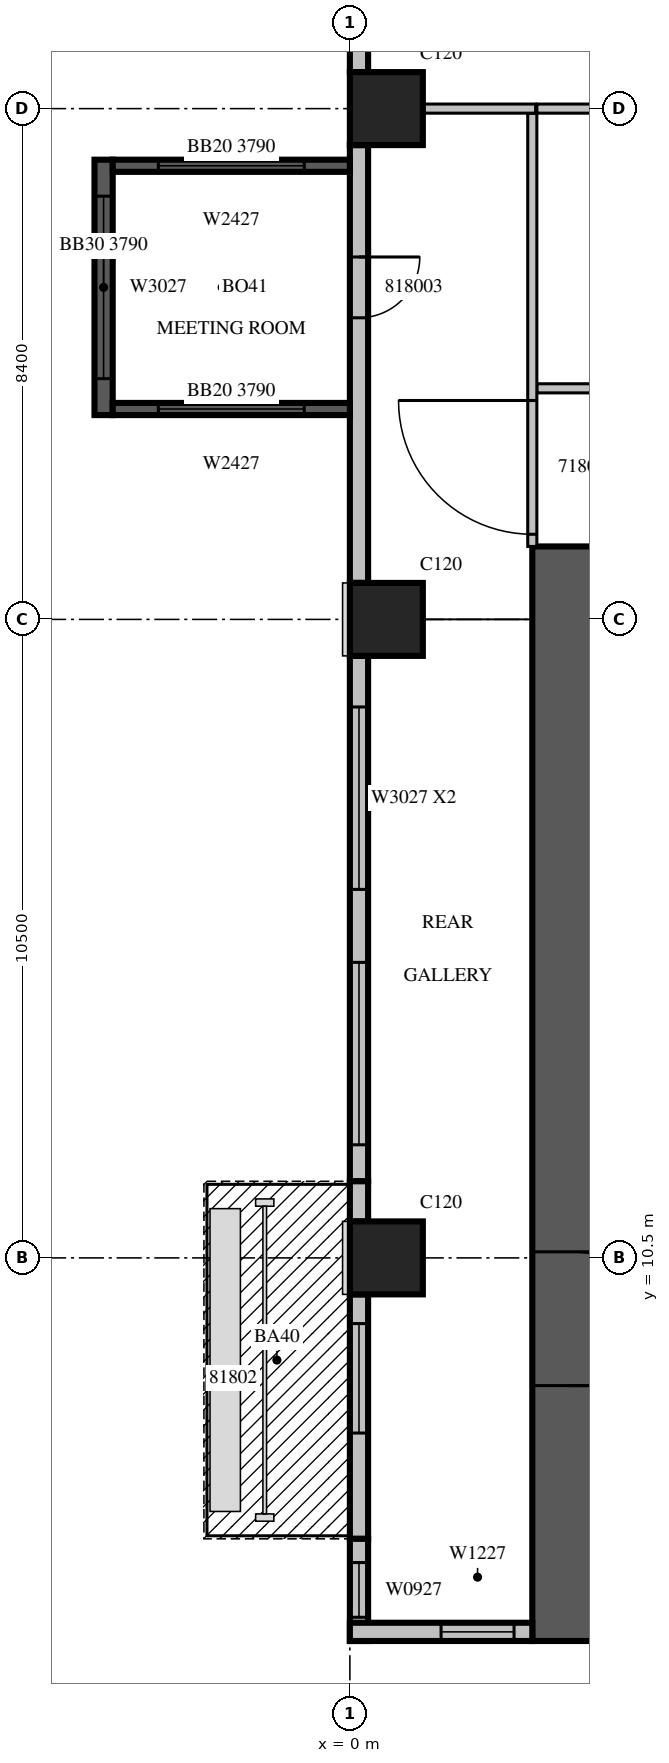
"""IFC4 building model, lengths in metres.
Left out: names, types, materials, properties, quantities, classifications, styles, units other than length and angle.
Written with IfcOpenShell. Run it as: python <this file> out.ifc"""

import sys

from ifc_helpers import new_model, si_unit, direction, frame, frame_2d, origin, origin_2d, place, context, subcontext, project, spatial, rectangle, extrude, source, transform, mapped, element, fill, save


model = new_model("IFC4")
c1 = context("Model", 3, precision=1e-05, world=origin(), true_north=direction((0.0, 1.0)))
c2 = subcontext(c1, "Body", "Model", "MODEL_VIEW")
j1 = project(units=[si_unit("LENGTHUNIT", "METRE"), si_unit("PLANEANGLEUNIT", "RADIAN")], contexts=[c1])
p1 = place(None, origin())
s1 = spatial("IfcSite", under=j1, at=p1, CompositionType="ELEMENT")
p2 = place(p1, origin())
s2 = spatial("IfcBuilding", under=s1, at=p2, CompositionType="ELEMENT")
p3 = place(p2, frame((0.0, 0.0, 86.7)))
s3 = spatial("IfcBuildingStorey", under=s2, at=p3, CompositionType="ELEMENT", Elevation=86.7)
m1 = source(origin(), c2, "Body", "SweptSolid", [
    extrude(rectangle(XDim=1.2, YDim=1.2, at=origin_2d()), origin(), (0.0, 0.0, 1.0), 4.2),
])
for number, where, z_axis, x_axis in (
    (1, (0.6, 10.5, 0.0), (0.0, 0.0, 1.0), (1.0, 0.0, 0.0)),
    (2, (0.6, 21.0, 0.0), (0.0, 0.0, 1.0), (1.0, 0.0, 0.0)),
    (3, (0.6, 29.4, 0.0), (0.0, 0.0, 1.0), (1.0, 0.0, 0.0)),
):
    element("IfcColumn", number, at=place(p3, frame(where, z_axis=z_axis, x_axis=x_axis)), inside=s3, PredefinedType="COLUMN", context=c2, shape_type="MappedRepresentation", body=[
        mapped(m1, transform((0.0, 0.0, 0.0), scale=1.0)),
    ])
m2 = source(origin(), c2, "Body", "SweptSolid", [
    extrude(rectangle(XDim=18.0, YDim=1.2, at=frame_2d((9.0, 0.0))), origin(), (0.0, 0.0, 1.0), 4.2),
])
p4 = place(p3, frame((3.6, 4.2, 0.0), z_axis=(0.0, 0.0, 1.0), x_axis=(0.0, 1.0, 0.0)))
e4 = element("IfcWall", 4, at=p4, inside=s3, PredefinedType="SHEAR", context=c2, shape_type="MappedRepresentation", body=[
    mapped(m2, transform((0.0, 0.0, 0.0), scale=1.0)),
])
m3 = source(origin(), c2, "Body", "SweptSolid", [
    extrude(rectangle(XDim=2.2, YDim=2.1, at=frame_2d((1.1, 1.05))), frame((0.0, 0.61, 0.0), z_axis=(0.0, -1.0, 0.0), x_axis=(1.0, 0.0, 0.0)), (0.0, 0.0, 1.0), 1.22),
])
p5 = place(p4, frame((4.2, 0.0, 0.0)))
e5 = element("IfcOpeningElement", 5, at=p5, cuts=e4, PredefinedType="OPENING", context=c2, shape_type="MappedRepresentation", body=[
    mapped(m3, transform((0.0, 0.0, 0.0), scale=1.0)),
])
m4 = source(origin(), c2, "Body", "SweptSolid", [
    extrude(rectangle(XDim=7.2, YDim=0.3, at=frame_2d((3.6, 0.0))), origin(), (0.0, 0.0, 1.0), 3.8),
])
p6 = place(p3, frame((0.15, 37.2, 0.0), z_axis=(0.0, 0.0, 1.0), x_axis=(0.0, -1.0, 0.0)))
e6 = element("IfcWall", 6, at=p6, inside=s3, PredefinedType="STANDARD", context=c2, shape_type="MappedRepresentation", body=[
    mapped(m4, transform((0.0, 0.0, 0.0), scale=1.0)),
])
m5 = source(origin(), c2, "Body", "SweptSolid", [
    extrude(rectangle(XDim=1.8, YDim=2.7, at=frame_2d((0.9, 1.35))), frame((0.0, 0.16, 0.0), z_axis=(0.0, -1.0, 0.0), x_axis=(1.0, 0.0, 0.0)), (0.0, 0.0, 1.0), 0.32),
])
p7 = place(p6, frame((1.008, 0.0, 0.6)))
e7 = element("IfcOpeningElement", 7, at=p7, cuts=e6, PredefinedType="OPENING", context=c2, shape_type="MappedRepresentation", body=[
    mapped(m5, transform((0.0, 0.0, 0.0), scale=1.0)),
])
m6 = source(origin(), c2, "Body", "SweptSolid", [
    extrude(rectangle(XDim=2.4, YDim=2.7, at=frame_2d((1.2, 1.35))), frame((0.0, 0.16, 0.0), z_axis=(0.0, -1.0, 0.0), x_axis=(1.0, 0.0, 0.0)), (0.0, 0.0, 1.0), 0.32),
])
p8 = place(p6, frame((3.804, 0.0, 0.6)))
e8 = element("IfcOpeningElement", 8, at=p8, cuts=e6, PredefinedType="OPENING", context=c2, shape_type="MappedRepresentation", body=[
    mapped(m6, transform((0.0, 0.0, 0.0), scale=1.0)),
])
p9 = place(p3, frame((0.15, 28.8, 0.0), z_axis=(0.0, 0.0, 1.0), x_axis=(0.0, -1.0, 0.0)))
e9 = element("IfcWall", 9, at=p9, inside=s3, PredefinedType="STANDARD", context=c2, shape_type="MappedRepresentation", body=[
    mapped(m4, transform((0.0, 0.0, 0.0), scale=1.0)),
])
m7 = source(origin(), c2, "Body", "SweptSolid", [
    extrude(rectangle(XDim=1.0, YDim=2.1, at=frame_2d((0.5, 1.05))), frame((0.0, 0.16, 0.0), z_axis=(0.0, -1.0, 0.0), x_axis=(1.0, 0.0, 0.0)), (0.0, 0.0, 1.0), 0.32),
])
p10 = place(p9, frame((1.84, 0.0, 0.0)))
e10 = element("IfcOpeningElement", 10, at=p10, cuts=e9, PredefinedType="OPENING", context=c2, shape_type="MappedRepresentation", body=[
    mapped(m7, transform((0.0, 0.0, 0.0), scale=1.0)),
])
m8 = source(origin(), c2, "Body", "SweptSolid", [
    extrude(rectangle(XDim=8.64, YDim=0.3, at=frame_2d((4.32, 0.0))), origin(), (0.0, 0.0, 1.0), 3.8),
])
p11 = place(p3, frame((0.15, 20.4, 0.0), z_axis=(0.0, 0.0, 1.0), x_axis=(0.0, -1.0, 0.0)))
e11 = element("IfcWall", 11, at=p11, inside=s3, PredefinedType="STANDARD", context=c2, shape_type="MappedRepresentation", body=[
    mapped(m8, transform((0.0, 0.0, 0.0), scale=1.0)),
])
m9 = source(origin(), c2, "Body", "SweptSolid", [
    extrude(rectangle(XDim=3.0, YDim=2.7, at=frame_2d((1.5, 1.35))), frame((0.0, 0.16, 0.0), z_axis=(0.0, -1.0, 0.0), x_axis=(1.0, 0.0, 0.0)), (0.0, 0.0, 1.0), 0.32),
])
p12 = place(p11, frame((0.84, 0.0, 0.6)))
e12 = element("IfcOpeningElement", 12, at=p12, cuts=e11, PredefinedType="OPENING", context=c2, shape_type="MappedRepresentation", body=[
    mapped(m9, transform((0.0, 0.0, 0.0), scale=1.0)),
])
p13 = place(p11, frame((5.04, 0.0, 0.6)))
e13 = element("IfcOpeningElement", 13, at=p13, cuts=e11, PredefinedType="OPENING", context=c2, shape_type="MappedRepresentation", body=[
    mapped(m9, transform((0.0, 0.0, 0.0), scale=1.0)),
])
m10 = source(origin(), c2, "Body", "SweptSolid", [
    extrude(rectangle(XDim=0.66, YDim=0.3, at=frame_2d((0.33, 0.0))), origin(), (0.0, 0.0, 1.0), 3.8),
])
p14 = place(p3, frame((0.15, 11.76, 0.0), z_axis=(0.0, 0.0, 1.0), x_axis=(0.0, -1.0, 0.0)))
e14 = element("IfcWall", 14, at=p14, inside=s3, PredefinedType="STANDARD", context=c2, shape_type="MappedRepresentation", body=[
    mapped(m10, transform((0.0, 0.0, 0.0), scale=1.0)),
])
m11 = source(origin(), c2, "Body", "SweptSolid", [
    extrude(rectangle(XDim=4.02, YDim=0.3, at=frame_2d((2.01, 0.0))), origin(), (0.0, 0.0, 1.0), 3.8),
])
p15 = place(p3, frame((0.15, 9.9, 0.0), z_axis=(0.0, 0.0, 1.0), x_axis=(0.0, -1.0, 0.0)))
e15 = element("IfcWall", 15, at=p15, inside=s3, PredefinedType="STANDARD", context=c2, shape_type="MappedRepresentation", body=[
    mapped(m11, transform((0.0, 0.0, 0.0), scale=1.0)),
])
m12 = source(origin(), c2, "Body", "SweptSolid", [
    extrude(rectangle(XDim=1.8, YDim=2.4, at=frame_2d((0.9, 1.2))), frame((0.0, 0.16, 0.0), z_axis=(0.0, -1.0, 0.0), x_axis=(1.0, 0.0, 0.0)), (0.0, 0.0, 1.0), 0.32),
])
p16 = place(p15, frame((0.48, 0.0, 0.0)))
e16 = element("IfcOpeningElement", 16, at=p16, cuts=e15, PredefinedType="OPENING", context=c2, shape_type="MappedRepresentation", body=[
    mapped(m12, transform((0.0, 0.0, 0.0), scale=1.0)),
])
m13 = source(origin(), c2, "Body", "SweptSolid", [
    extrude(rectangle(XDim=1.68, YDim=0.3, at=frame_2d((0.84, 0.0))), origin(), (0.0, 0.0, 1.0), 3.8),
])
p17 = place(p3, frame((0.15, 5.88, 0.0), z_axis=(0.0, 0.0, 1.0), x_axis=(0.0, -1.0, 0.0)))
e17 = element("IfcWall", 17, at=p17, inside=s3, PredefinedType="STANDARD", context=c2, shape_type="MappedRepresentation", body=[
    mapped(m13, transform((0.0, 0.0, 0.0), scale=1.0)),
])
m14 = source(origin(), c2, "Body", "SweptSolid", [
    extrude(rectangle(XDim=0.9, YDim=2.7, at=frame_2d((0.45, 1.35))), frame((0.0, 0.16, 0.0), z_axis=(0.0, -1.0, 0.0), x_axis=(1.0, 0.0, 0.0)), (0.0, 0.0, 1.0), 0.32),
])
p18 = place(p17, frame((0.39, 0.0, 0.6)))
e18 = element("IfcOpeningElement", 18, at=p18, cuts=e17, PredefinedType="OPENING", context=c2, shape_type="MappedRepresentation", body=[
    mapped(m14, transform((0.0, 0.0, 0.0), scale=1.0)),
])
m15 = source(origin(), c2, "Body", "SweptSolid", [
    extrude(rectangle(XDim=3.0, YDim=0.3, at=frame_2d((1.5, 0.0))), origin(), (0.0, 0.0, 1.0), 3.8),
])
p19 = place(p3, frame((0.0, 4.35, 0.0), z_axis=(0.0, 0.0, 1.0), x_axis=(1.0, 0.0, 0.0)))
e19 = element("IfcWall", 19, at=p19, inside=s3, PredefinedType="STANDARD", context=c2, shape_type="MappedRepresentation", body=[
    mapped(m15, transform((0.0, 0.0, 0.0), scale=1.0)),
])
m16 = source(origin(), c2, "Body", "SweptSolid", [
    extrude(rectangle(XDim=1.2, YDim=2.7, at=frame_2d((0.6, 1.35))), frame((0.0, 0.16, 0.0), z_axis=(0.0, -1.0, 0.0), x_axis=(1.0, 0.0, 0.0)), (0.0, 0.0, 1.0), 0.32),
])
p20 = place(p19, frame((1.5, 0.0, 0.6)))
e20 = element("IfcOpeningElement", 20, at=p20, cuts=e19, PredefinedType="OPENING", context=c2, shape_type="MappedRepresentation", body=[
    mapped(m16, transform((0.0, 0.0, 0.0), scale=1.0)),
])
m17 = source(origin(), c2, "Body", "SweptSolid", [
    extrude(rectangle(XDim=4.2, YDim=0.3, at=frame_2d((2.1, 0.0))), origin(), (0.0, 0.0, 1.0), 3.79),
])
p21 = place(p3, frame((-4.05, 28.56, 0.0), z_axis=(0.0, 0.0, 1.0), x_axis=(0.0, -1.0, 0.0)))
e21 = element("IfcWall", 21, at=p21, inside=s3, PredefinedType="SOLIDWALL", context=c2, shape_type="MappedRepresentation", body=[
    mapped(m17, transform((0.0, 0.0, 0.0), scale=1.0)),
])
p22 = place(p21, frame((0.6, 0.0, 0.6)))
e22 = element("IfcOpeningElement", 22, at=p22, cuts=e21, PredefinedType="OPENING", context=c2, shape_type="MappedRepresentation", body=[
    mapped(m9, transform((0.0, 0.0, 0.0), scale=1.0)),
])
m18 = source(origin(), c2, "Body", "SweptSolid", [
    extrude(rectangle(XDim=3.9, YDim=0.2, at=frame_2d((1.95, 0.0))), origin(), (0.0, 0.0, 1.0), 3.79),
])
p23 = place(p3, frame((0.0, 28.46, 0.0), z_axis=(0.0, 0.0, 1.0), x_axis=(-1.0, 0.0, 0.0)))
e23 = element("IfcWall", 23, at=p23, inside=s3, PredefinedType="SOLIDWALL", context=c2, shape_type="MappedRepresentation", body=[
    mapped(m18, transform((0.0, 0.0, 0.0), scale=1.0)),
])
m19 = source(origin(), c2, "Body", "SweptSolid", [
    extrude(rectangle(XDim=2.4, YDim=2.7, at=frame_2d((1.2, 1.35))), frame((0.0, 0.11, 0.0), z_axis=(0.0, -1.0, 0.0), x_axis=(1.0, 0.0, 0.0)), (0.0, 0.0, 1.0), 0.22),
])
p24 = place(p23, frame((0.75, 0.0, 0.6)))
e24 = element("IfcOpeningElement", 24, at=p24, cuts=e23, PredefinedType="OPENING", context=c2, shape_type="MappedRepresentation", body=[
    mapped(m19, transform((0.0, 0.0, 0.0), scale=1.0)),
])
p25 = place(p3, frame((0.0, 24.46, 0.0), z_axis=(0.0, 0.0, 1.0), x_axis=(-1.0, 0.0, 0.0)))
e25 = element("IfcWall", 25, at=p25, inside=s3, PredefinedType="SOLIDWALL", context=c2, shape_type="MappedRepresentation", body=[
    mapped(m18, transform((0.0, 0.0, 0.0), scale=1.0)),
])
p26 = place(p25, frame((0.75, 0.0, 0.6)))
e26 = element("IfcOpeningElement", 26, at=p26, cuts=e25, PredefinedType="OPENING", context=c2, shape_type="MappedRepresentation", body=[
    mapped(m19, transform((0.0, 0.0, 0.0), scale=1.0)),
])
m20 = source(origin(), c2, "Body", "SweptSolid", [
    extrude(rectangle(XDim=11.625, YDim=0.15, at=frame_2d((5.812, 0.0))), origin(), (0.0, 0.0, 1.0), 3.8),
])
p27 = place(p3, frame((3.075, 24.8, 0.0), z_axis=(0.0, 0.0, 1.0), x_axis=(1.0, 0.0, 0.0)))
e27 = element("IfcWall", 27, at=p27, inside=s3, PredefinedType="PARTITIONING", context=c2, shape_type="MappedRepresentation", body=[
    mapped(m20, transform((0.0, 0.0, 0.0), scale=1.0)),
])
m21 = source(origin(), c2, "Body", "SweptSolid", [
    extrude(rectangle(XDim=0.9, YDim=2.1, at=frame_2d((0.45, 1.05))), frame((0.0, 0.085, 0.0), z_axis=(0.0, -1.0, 0.0), x_axis=(1.0, 0.0, 0.0)), (0.0, 0.0, 1.0), 0.17),
])
p28 = place(p27, frame((2.663, 0.0, 0.0)))
e28 = element("IfcOpeningElement", 28, at=p28, cuts=e27, PredefinedType="OPENING", context=c2, shape_type="MappedRepresentation", body=[
    mapped(m21, transform((0.0, 0.0, 0.0), scale=1.0)),
])
p29 = place(p27, frame((9.35, 0.0, 0.0)))
e29 = element("IfcOpeningElement", 29, at=p29, cuts=e27, PredefinedType="OPENING", context=c2, shape_type="MappedRepresentation", body=[
    mapped(m21, transform((0.0, 0.0, 0.0), scale=1.0)),
])
m22 = source(origin(), c2, "Body", "SweptSolid", [
    extrude(rectangle(XDim=6.826, YDim=0.15, at=frame_2d((3.413, 0.0))), origin(), (0.0, 0.0, 1.0), 3.8),
])
p30 = place(p3, frame((9.901, 29.4, 0.0), z_axis=(0.0, 0.0, 1.0), x_axis=(-1.0, 0.0, 0.0)))
e30 = element("IfcWall", 30, at=p30, inside=s3, PredefinedType="PARTITIONING", context=c2, shape_type="MappedRepresentation", body=[
    mapped(m22, transform((0.0, 0.0, 0.0), scale=1.0)),
])
m23 = source(origin(), c2, "Body", "SweptSolid", [
    extrude(rectangle(XDim=7.125, YDim=0.15, at=frame_2d((3.562, 0.0))), origin(), (0.0, 0.0, 1.0), 3.8),
])
p31 = place(p3, frame((3.0, 29.325, 0.0), z_axis=(0.0, 0.0, 1.0), x_axis=(0.0, -1.0, 0.0)))
e31 = element("IfcWall", 31, at=p31, inside=s3, PredefinedType="PARTITIONING", context=c2, shape_type="MappedRepresentation", body=[
    mapped(m23, transform((0.0, 0.0, 0.0), scale=1.0)),
])
m24 = source(origin(), c2, "Body", "SweptSolid", [
    extrude(rectangle(XDim=2.2, YDim=2.1, at=frame_2d((1.1, 1.05))), frame((0.0, 0.085, 0.0), z_axis=(0.0, -1.0, 0.0), x_axis=(1.0, 0.0, 0.0)), (0.0, 0.0, 1.0), 0.17),
])
p32 = place(p31, frame((4.725, 0.0, 0.0)))
e32 = element("IfcOpeningElement", 32, at=p32, cuts=e31, PredefinedType="OPENING", context=c2, shape_type="MappedRepresentation", body=[
    mapped(m24, transform((0.0, 0.0, 0.0), scale=1.0)),
])
m25 = source(origin(), c2, "Body", "SweptSolid", [
    extrude(rectangle(XDim=1.856, YDim=0.15, at=frame_2d((0.928, 0.0))), origin(), (0.0, 0.0, 1.0), 3.8),
])
p33 = place(p3, frame((3.055, 29.4, 0.0), z_axis=(0.0, 0.0, 1.0), x_axis=(-1.0, 0.0, 0.0)))
e33 = element("IfcWall", 33, at=p33, inside=s3, PredefinedType="PARTITIONING", context=c2, shape_type="MappedRepresentation", body=[
    mapped(m25, transform((0.0, 0.0, 0.0), scale=1.0)),
])
m26 = source(origin(), c2, "Body", "SweptSolid", [
    extrude(rectangle(XDim=3.0, YDim=2.7, at=frame_2d((1.5, 1.35))), frame((0.0, 0.03, 0.0), z_axis=(0.0, -1.0, 0.0), x_axis=(1.0, 0.0, 0.0)), (0.0, 0.0, 1.0), 0.06),
])
p34 = place(p12, origin())
e34 = element("IfcWindow", 34, at=p34, inside=s3, PartitioningType="SINGLE_PANEL", PredefinedType="WINDOW", context=c2, shape_type="MappedRepresentation", body=[
    mapped(m26, transform((0.0, 0.0, 0.0), scale=1.0)),
])
fill(e12, e34)
p35 = place(p13, origin())
e35 = element("IfcWindow", 35, at=p35, inside=s3, PartitioningType="SINGLE_PANEL", PredefinedType="WINDOW", context=c2, shape_type="MappedRepresentation", body=[
    mapped(m26, transform((0.0, 0.0, 0.0), scale=1.0)),
])
fill(e13, e35)
m27 = source(origin(), c2, "Body", "SweptSolid", [
    extrude(rectangle(XDim=1.8, YDim=2.4, at=frame_2d((0.9, 1.2))), frame((0.0, 0.025, 0.0), z_axis=(0.0, -1.0, 0.0), x_axis=(1.0, 0.0, 0.0)), (0.0, 0.0, 1.0), 0.05),
])
p36 = place(p16, origin())
e36 = element("IfcDoor", 36, at=p36, inside=s3, OperationType="SLIDING_TO_LEFT", PredefinedType="DOOR", context=c2, shape_type="MappedRepresentation", body=[
    mapped(m27, transform((0.0, 0.0, 0.0), scale=1.0)),
])
fill(e16, e36)
m28 = source(origin(), c2, "Body", "SweptSolid", [
    extrude(rectangle(XDim=0.9, YDim=2.7, at=frame_2d((0.45, 1.35))), frame((0.0, 0.03, 0.0), z_axis=(0.0, -1.0, 0.0), x_axis=(1.0, 0.0, 0.0)), (0.0, 0.0, 1.0), 0.06),
])
p37 = place(p18, origin())
e37 = element("IfcWindow", 37, at=p37, inside=s3, PartitioningType="SINGLE_PANEL", PredefinedType="WINDOW", context=c2, shape_type="MappedRepresentation", body=[
    mapped(m28, transform((0.0, 0.0, 0.0), scale=1.0)),
])
fill(e18, e37)
m29 = source(origin(), c2, "Body", "SweptSolid", [
    extrude(rectangle(XDim=1.2, YDim=2.7, at=frame_2d((0.6, 1.35))), frame((0.0, 0.03, 0.0), z_axis=(0.0, -1.0, 0.0), x_axis=(1.0, 0.0, 0.0)), (0.0, 0.0, 1.0), 0.06),
])
p38 = place(p20, origin())
e38 = element("IfcWindow", 38, at=p38, inside=s3, PartitioningType="SINGLE_PANEL", PredefinedType="WINDOW", context=c2, shape_type="MappedRepresentation", body=[
    mapped(m29, transform((0.0, 0.0, 0.0), scale=1.0)),
])
fill(e20, e38)
p39 = place(p22, origin())
e39 = element("IfcWindow", 39, at=p39, inside=s3, PartitioningType="SINGLE_PANEL", PredefinedType="WINDOW", context=c2, shape_type="MappedRepresentation", body=[
    mapped(m26, transform((0.0, 0.0, 0.0), scale=1.0)),
])
fill(e22, e39)
m30 = source(origin(), c2, "Body", "SweptSolid", [
    extrude(rectangle(XDim=2.4, YDim=2.7, at=frame_2d((1.2, 1.35))), frame((0.0, 0.03, 0.0), z_axis=(0.0, -1.0, 0.0), x_axis=(1.0, 0.0, 0.0)), (0.0, 0.0, 1.0), 0.06),
])
p40 = place(p24, origin())
e40 = element("IfcWindow", 40, at=p40, inside=s3, PartitioningType="SINGLE_PANEL", PredefinedType="WINDOW", context=c2, shape_type="MappedRepresentation", body=[
    mapped(m30, transform((0.0, 0.0, 0.0), scale=1.0)),
])
fill(e24, e40)
p41 = place(p26, origin())
e41 = element("IfcWindow", 41, at=p41, inside=s3, PartitioningType="SINGLE_PANEL", PredefinedType="WINDOW", context=c2, shape_type="MappedRepresentation", body=[
    mapped(m30, transform((0.0, 0.0, 0.0), scale=1.0)),
])
fill(e26, e41)
m31 = source(origin(), c2, "Body", "SweptSolid", [
    extrude(rectangle(XDim=2.2, YDim=2.1, at=frame_2d((1.1, 1.05))), frame((0.0, 0.025, 0.0), z_axis=(0.0, -1.0, 0.0), x_axis=(1.0, 0.0, 0.0)), (0.0, 0.0, 1.0), 0.05),
])
p42 = place(p5, origin())
e42 = element("IfcDoor", 42, at=p42, inside=s3, OperationType="DOUBLE_DOOR_SINGLE_SWING", PredefinedType="DOOR", context=c2, shape_type="MappedRepresentation", body=[
    mapped(m31, transform((0.0, 0.0, 0.0), scale=1.0)),
])
fill(e5, e42)
p43 = place(p32, origin())
e43 = element("IfcDoor", 43, at=p43, inside=s3, OperationType="DOUBLE_DOOR_SINGLE_SWING", PredefinedType="DOOR", context=c2, shape_type="MappedRepresentation", body=[
    mapped(m31, transform((0.0, 0.0, 0.0), scale=1.0)),
])
fill(e32, e43)
m32 = source(origin(), c2, "Body", "SweptSolid", [
    extrude(rectangle(XDim=1.0, YDim=2.1, at=frame_2d((0.5, 1.05))), frame((0.0, 0.025, 0.0), z_axis=(0.0, -1.0, 0.0), x_axis=(1.0, 0.0, 0.0)), (0.0, 0.0, 1.0), 0.05),
])
p44 = place(p10, origin())
e44 = element("IfcDoor", 44, at=p44, inside=s3, OperationType="SINGLE_SWING_LEFT", PredefinedType="DOOR", context=c2, shape_type="MappedRepresentation", body=[
    mapped(m32, transform((0.0, 0.0, 0.0), scale=1.0)),
])
fill(e10, e44)
save(model, sys.argv[1])
